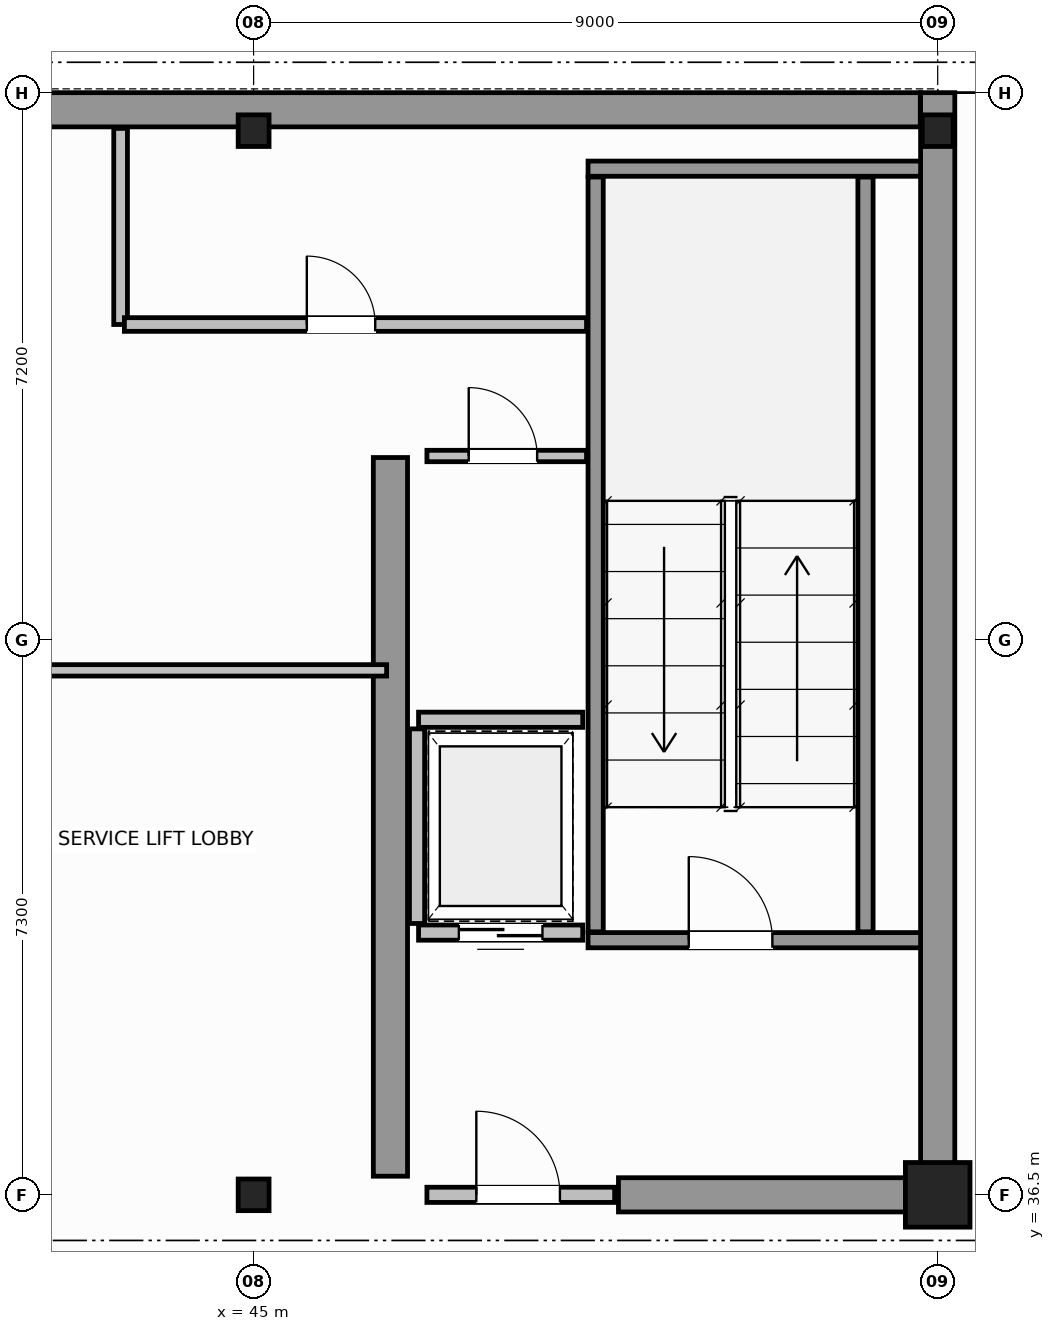
"""IFC4 building model, lengths in metres.
Left out: names, types, materials, properties, quantities, classifications, styles, units other than length and angle.
Written with IfcOpenShell. Run it as: python <this file> out.ifc"""

import sys

from ifc_helpers import new_model, si_unit, direction, frame, frame_2d, origin, origin_2d, place, context, subcontext, project, spatial, rectangle, i_section, extrude, source, transform, mapped, element, fill, save


model = new_model("IFC4")
c1 = context("Model", 3, precision=1e-05, world=origin(), true_north=direction((0.0, 1.0)))
c2 = subcontext(c1, "Body", "Model", "MODEL_VIEW")
j1 = project(units=[si_unit("LENGTHUNIT", "METRE"), si_unit("PLANEANGLEUNIT", "RADIAN")], contexts=[c1])
p1 = place(None, origin())
s1 = spatial("IfcSite", under=j1, at=p1, CompositionType="ELEMENT")
p2 = place(p1, origin())
s2 = spatial("IfcBuilding", under=s1, at=p2, CompositionType="ELEMENT")
p3 = place(p2, frame((0.0, 0.0, 308.4)))
s3 = spatial("IfcBuildingStorey", under=s2, at=p3, CompositionType="ELEMENT", Elevation=308.4)
m1 = source(origin(), c2, "Body", "SweptSolid", [
    extrude(i_section(OverallWidth=0.406, OverallDepth=0.416, WebThickness=0.03, FlangeThickness=0.042, FilletRadius=0.015, at=origin_2d()), origin(), (0.0, 0.0, 1.0), 4.4),
])
p4 = place(p3, frame((45.0, 36.5, 0.0), z_axis=(0.0, 0.0, 1.0), x_axis=(1.0, 0.0, 0.0)))
e1 = element("IfcColumn", 1, at=p4, inside=s3, PredefinedType="COLUMN", context=c2, shape_type="MappedRepresentation", body=[
    mapped(m1, transform((0.0, 0.0, 0.0), scale=1.0)),
])
m2 = source(origin(), c2, "Body", "SweptSolid", [
    extrude(rectangle(XDim=0.85, YDim=0.85, at=origin_2d()), origin(), (0.0, 0.0, 1.0), 4.4),
])
p5 = place(p3, frame((54.0, 36.5, 0.0), z_axis=(0.0, 0.0, 1.0), x_axis=(1.0, 0.0, 0.0)))
e2 = element("IfcColumn", 2, at=p5, inside=s3, PredefinedType="COLUMN", context=c2, shape_type="MappedRepresentation", body=[
    mapped(m2, transform((0.0, 0.0, 0.0), scale=1.0)),
])
for number, where, z_axis, x_axis in (
    (3, (45.0, 50.5, 0.0), (0.0, 0.0, 1.0), (1.0, 0.0, 0.0)),
    (4, (54.0, 50.5, 0.0), (0.0, 0.0, 1.0), (1.0, 0.0, 0.0)),
):
    element("IfcColumn", number, at=place(p3, frame(where, z_axis=z_axis, x_axis=x_axis)), inside=s3, PredefinedType="COLUMN", context=c2, shape_type="MappedRepresentation", body=[
        mapped(m1, transform((0.0, 0.0, 0.0), scale=1.0)),
    ])
p6 = place(p3, frame((34.002, 50.775, 0.0), z_axis=(0.0, 0.0, 1.0), x_axis=(1.0, 0.0, 0.0)))
e5 = element("IfcWall", 5, at=p6, inside=s3, PredefinedType="SHEAR", context=c2, shape_type="SweptSolid", body=[
    extrude(rectangle(XDim=19.769, YDim=0.45, at=frame_2d((9.885, 0.0))), origin(), (0.0, 0.0, 1.0), 4.4),
])
p7 = place(p3, frame((54.0, 36.5, 0.0), z_axis=(0.0, 0.0, 1.0), x_axis=(0.0, 1.0, 0.0)))
e6 = element("IfcWall", 6, at=p7, inside=s3, PredefinedType="SHEAR", context=c2, shape_type="SweptSolid", body=[
    extrude(rectangle(XDim=14.5, YDim=0.45, at=frame_2d((7.25, 0.0))), origin(), (0.0, 0.0, 1.0), 4.4),
])
p8 = place(p3, frame((49.8, 36.5, 0.0), z_axis=(0.0, 0.0, 1.0), x_axis=(1.0, 0.0, 0.0)))
e7 = element("IfcWall", 7, at=p8, inside=s3, PredefinedType="SHEAR", context=c2, shape_type="SweptSolid", body=[
    extrude(rectangle(XDim=3.955, YDim=0.45, at=frame_2d((1.978, 0.0))), origin(), (0.0, 0.0, 1.0), 3.1),
])
p9 = place(p3, frame((46.8, 36.745, 0.0), z_axis=(0.0, 0.0, 1.0), x_axis=(0.0, 1.0, 0.0)))
e8 = element("IfcWall", 8, at=p9, inside=s3, PredefinedType="SHEAR", context=c2, shape_type="SweptSolid", body=[
    extrude(rectangle(XDim=9.455, YDim=0.45, at=frame_2d((4.728, 0.0))), origin(), (0.0, 0.0, 1.0), 4.4),
])
p10 = place(p3, frame((49.4, 39.85, 0.0), z_axis=(0.0, 0.0, 1.0), x_axis=(1.0, 0.0, 0.0)))
e9 = element("IfcWall", 9, at=p10, inside=s3, PredefinedType="SOLIDWALL", context=c2, shape_type="SweptSolid", body=[
    extrude(rectangle(XDim=4.375, YDim=0.2, at=frame_2d((2.188, 0.0))), origin(), (0.0, 0.0, 1.0), 4.4),
])
p11 = place(p10, frame((1.325, 0.0, 0.0)))
e10 = element("IfcOpeningElement", 10, at=p11, cuts=e9, PredefinedType="OPENING", context=c2, shape_type="SweptSolid", body=[
    extrude(rectangle(XDim=1.1, YDim=2.15, at=frame_2d((0.55, 1.075))), frame((0.0, 0.11, 0.0), z_axis=(0.0, -1.0, 0.0), x_axis=(1.0, 0.0, 0.0)), (0.0, 0.0, 1.0), 0.22),
])
p12 = place(p3, frame((49.4, 50.0, 0.0), z_axis=(0.0, 0.0, 1.0), x_axis=(1.0, 0.0, 0.0)))
e11 = element("IfcWall", 11, at=p12, inside=s3, PredefinedType="SOLIDWALL", context=c2, shape_type="SweptSolid", body=[
    extrude(rectangle(XDim=4.375, YDim=0.2, at=frame_2d((2.188, 0.0))), origin(), (0.0, 0.0, 1.0), 4.4),
])
for number, where, z_axis, x_axis in (
    (12, (49.5, 39.96, 0.0), (0.0, 0.0, 1.0), (0.0, 1.0, 0.0)),
    (13, (53.05, 39.96, 0.0), (0.0, 0.0, 1.0), (0.0, 1.0, 0.0)),
):
    element("IfcWall", number, at=place(p3, frame(where, z_axis=z_axis, x_axis=x_axis)), inside=s3, PredefinedType="SOLIDWALL", context=c2, shape_type="SweptSolid", body=[
        extrude(rectangle(XDim=9.93, YDim=0.2, at=frame_2d((4.965, 0.0))), origin(), (0.0, 0.0, 1.0), 4.4),
    ])
p13 = place(p3, frame((47.28, 36.5, 0.0), z_axis=(0.0, 0.0, 1.0), x_axis=(1.0, 0.0, 0.0)))
e14 = element("IfcWall", 14, at=p13, inside=s3, PredefinedType="SOLIDWALL", context=c2, shape_type="SweptSolid", body=[
    extrude(rectangle(XDim=2.47, YDim=0.2, at=frame_2d((1.235, 0.0))), origin(), (0.0, 0.0, 1.0), 3.09),
])
p14 = place(p13, frame((0.65, 0.0, 0.0)))
e15 = element("IfcOpeningElement", 15, at=p14, cuts=e14, PredefinedType="OPENING", context=c2, shape_type="SweptSolid", body=[
    extrude(rectangle(XDim=1.1, YDim=2.15, at=frame_2d((0.55, 1.075))), frame((0.0, 0.11, 0.0), z_axis=(0.0, -1.0, 0.0), x_axis=(1.0, 0.0, 0.0)), (0.0, 0.0, 1.0), 0.22),
])
p15 = place(p3, frame((47.17, 39.95, 0.0), z_axis=(0.0, 0.0, 1.0), x_axis=(1.0, 0.0, 0.0)))
e16 = element("IfcWall", 16, at=p15, inside=s3, PredefinedType="SOLIDWALL", context=c2, shape_type="SweptSolid", body=[
    extrude(rectangle(XDim=2.16, YDim=0.2, at=frame_2d((1.08, 0.0))), origin(), (0.0, 0.0, 1.0), 4.1),
])
p16 = place(p15, frame((0.53, 0.0, 0.0)))
e17 = element("IfcOpeningElement", 17, at=p16, cuts=e16, PredefinedType="OPENING", context=c2, shape_type="SweptSolid", body=[
    extrude(rectangle(XDim=1.1, YDim=2.15, at=frame_2d((0.55, 1.075))), frame((0.0, 0.11, 0.0), z_axis=(0.0, -1.0, 0.0), x_axis=(1.0, 0.0, 0.0)), (0.0, 0.0, 1.0), 0.22),
])
p17 = place(p3, frame((47.17, 42.75, 0.0), z_axis=(0.0, 0.0, 1.0), x_axis=(1.0, 0.0, 0.0)))
e18 = element("IfcWall", 18, at=p17, inside=s3, PredefinedType="SOLIDWALL", context=c2, shape_type="SweptSolid", body=[
    extrude(rectangle(XDim=2.16, YDim=0.2, at=frame_2d((1.08, 0.0))), origin(), (0.0, 0.0, 1.0), 4.1),
])
p18 = place(p3, frame((47.15, 40.07, 0.0), z_axis=(0.0, 0.0, 1.0), x_axis=(0.0, 1.0, 0.0)))
e19 = element("IfcWall", 19, at=p18, inside=s3, PredefinedType="SOLIDWALL", context=c2, shape_type="SweptSolid", body=[
    extrude(rectangle(XDim=2.56, YDim=0.2, at=frame_2d((1.28, 0.0))), origin(), (0.0, 0.0, 1.0), 4.1),
])
p19 = place(p3, frame((40.55, 43.4, 0.0), z_axis=(0.0, 0.0, 1.0), x_axis=(1.0, 0.0, 0.0)))
e20 = element("IfcWall", 20, at=p19, inside=s3, PredefinedType="PARTITIONING", context=c2, shape_type="SweptSolid", body=[
    extrude(rectangle(XDim=6.2, YDim=0.15, at=frame_2d((3.1, 0.0))), origin(), (0.0, 0.0, 1.0), 4.1),
])
p20 = place(p3, frame((47.28, 46.22, 0.0), z_axis=(0.0, 0.0, 1.0), x_axis=(1.0, 0.0, 0.0)))
e21 = element("IfcWall", 21, at=p20, inside=s3, PredefinedType="PARTITIONING", context=c2, shape_type="SweptSolid", body=[
    extrude(rectangle(XDim=2.1, YDim=0.15, at=frame_2d((1.05, 0.0))), origin(), (0.0, 0.0, 1.0), 4.1),
])
p21 = place(p20, frame((0.55, 0.0, 0.0)))
e22 = element("IfcOpeningElement", 22, at=p21, cuts=e21, PredefinedType="OPENING", context=c2, shape_type="SweptSolid", body=[
    extrude(rectangle(XDim=0.9, YDim=2.1, at=frame_2d((0.45, 1.05))), frame((0.0, 0.085, 0.0), z_axis=(0.0, -1.0, 0.0), x_axis=(1.0, 0.0, 0.0)), (0.0, 0.0, 1.0), 0.17),
])
p22 = place(p3, frame((43.25, 47.95, 0.0), z_axis=(0.0, 0.0, 1.0), x_axis=(0.0, 1.0, 0.0)))
e23 = element("IfcWall", 23, at=p22, inside=s3, PredefinedType="PLUMBINGWALL", context=c2, shape_type="SweptSolid", body=[
    extrude(rectangle(XDim=2.58, YDim=0.18, at=frame_2d((1.29, 0.0))), origin(), (0.0, 0.0, 1.0), 4.1),
])
p23 = place(p3, frame((43.3, 47.95, 0.0), z_axis=(0.0, 0.0, 1.0), x_axis=(1.0, 0.0, 0.0)))
e24 = element("IfcWall", 24, at=p23, inside=s3, PredefinedType="PLUMBINGWALL", context=c2, shape_type="SweptSolid", body=[
    extrude(rectangle(XDim=6.08, YDim=0.18, at=frame_2d((3.04, 0.0))), origin(), (0.0, 0.0, 1.0), 4.1),
])
p24 = place(p23, frame((2.4, 0.0, 0.0)))
e25 = element("IfcOpeningElement", 25, at=p24, cuts=e24, PredefinedType="OPENING", context=c2, shape_type="SweptSolid", body=[
    extrude(rectangle(XDim=0.9, YDim=2.15, at=frame_2d((0.45, 1.075))), frame((0.0, 0.1, 0.0), z_axis=(0.0, -1.0, 0.0), x_axis=(1.0, 0.0, 0.0)), (0.0, 0.0, 1.0), 0.2),
])
m3 = source(origin(), c2, "Body", "SweptSolid", [
    extrude(rectangle(XDim=1.1, YDim=2.15, at=frame_2d((0.55, 1.075))), frame((0.0, 0.025, 0.0), z_axis=(0.0, -1.0, 0.0), x_axis=(1.0, 0.0, 0.0)), (0.0, 0.0, 1.0), 0.05),
])
p25 = place(p11, origin())
e26 = element("IfcDoor", 26, at=p25, inside=s3, OperationType="SINGLE_SWING_RIGHT", PredefinedType="DOOR", context=c2, shape_type="MappedRepresentation", body=[
    mapped(m3, transform((0.0, 0.0, 0.0), scale=1.0)),
])
fill(e10, e26)
p26 = place(p14, origin())
e27 = element("IfcDoor", 27, at=p26, inside=s3, OperationType="SINGLE_SWING_LEFT", PredefinedType="DOOR", context=c2, shape_type="MappedRepresentation", body=[
    mapped(m3, transform((0.0, 0.0, 0.0), scale=1.0)),
])
fill(e15, e27)
p27 = place(p16, origin())
e28 = element("IfcDoor", 28, at=p27, inside=s3, OperationType="DOUBLE_DOOR_SLIDING", PredefinedType="DOOR", context=c2, shape_type="MappedRepresentation", body=[
    mapped(m3, transform((0.0, 0.0, 0.0), scale=1.0)),
])
fill(e17, e28)
m4 = source(origin(), c2, "Body", "SweptSolid", [
    extrude(rectangle(XDim=0.9, YDim=2.1, at=frame_2d((0.45, 1.05))), frame((0.0, 0.025, 0.0), z_axis=(0.0, -1.0, 0.0), x_axis=(1.0, 0.0, 0.0)), (0.0, 0.0, 1.0), 0.05),
])
p28 = place(p21, origin())
e29 = element("IfcDoor", 29, at=p28, inside=s3, OperationType="SINGLE_SWING_RIGHT", PredefinedType="DOOR", context=c2, shape_type="MappedRepresentation", body=[
    mapped(m4, transform((0.0, 0.0, 0.0), scale=1.0)),
])
fill(e22, e29)
m5 = source(origin(), c2, "Body", "SweptSolid", [
    extrude(rectangle(XDim=0.9, YDim=2.15, at=frame_2d((0.45, 1.075))), frame((0.0, 0.025, 0.0), z_axis=(0.0, -1.0, 0.0), x_axis=(1.0, 0.0, 0.0)), (0.0, 0.0, 1.0), 0.05),
])
p29 = place(p24, origin())
e30 = element("IfcDoor", 30, at=p29, inside=s3, OperationType="SINGLE_SWING_RIGHT", PredefinedType="DOOR", context=c2, shape_type="MappedRepresentation", body=[
    mapped(m5, transform((0.0, 0.0, 0.0), scale=1.0)),
])
fill(e25, e30)
save(model, sys.argv[1])
